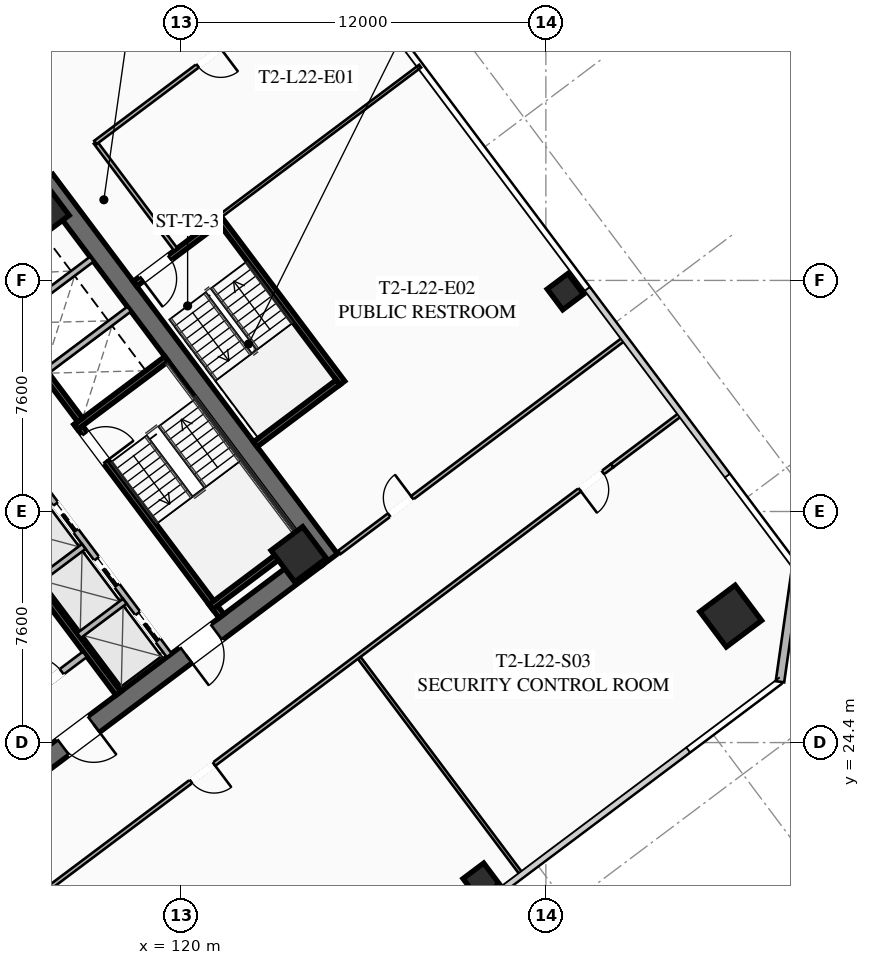
"""IFC4 building model, lengths in metres.
Left out: names, types, materials, properties, quantities, classifications, styles, units other than length and angle.
Written with IfcOpenShell. Run it as: python <this file> out.ifc"""

import sys

from ifc_helpers import new_model, si_unit, direction, frame, frame_2d, origin, origin_2d, place, context, subcontext, project, spatial, rectangle, hollow_rectangle, extrude, element, fill, save


model = new_model("IFC4")
c1 = context("Model", 3, precision=1e-05, world=origin(), true_north=direction((0.0, 1.0)))
c2 = subcontext(c1, "Body", "Model", "MODEL_VIEW")
j1 = project(units=[si_unit("LENGTHUNIT", "METRE"), si_unit("PLANEANGLEUNIT", "RADIAN")], contexts=[c1])
p1 = place(None, origin())
s1 = spatial("IfcSite", under=j1, at=p1, CompositionType="ELEMENT")
p2 = place(p1, origin())
s2 = spatial("IfcBuilding", under=s1, at=p2, CompositionType="ELEMENT")
p3 = place(p2, frame((0.0, 0.0, 84.95)))
s3 = spatial("IfcBuildingStorey", under=s2, at=p3, CompositionType="ELEMENT", Elevation=84.95)
p4 = place(p3, frame((115.524, 42.893, 0.0), z_axis=(0.0, 0.0, 1.0), x_axis=(0.600005007985, -0.799996243986, 0.0)))
e1 = element("IfcWall", 1, at=p4, inside=s3, PredefinedType="SHEAR", context=c2, shape_type="SweptSolid", body=[
    extrude(rectangle(XDim=15.6, YDim=0.65, at=frame_2d((7.8, 0.0))), origin(), (0.0, 0.0, 1.0), 3.55),
])
p5 = place(p3, frame((124.429, 30.478, 0.0), z_axis=(0.0, 0.0, 1.0), x_axis=(-0.799998028465, -0.600002628705, 0.0)))
e2 = element("IfcWall", 2, at=p5, inside=s3, PredefinedType="SHEAR", context=c2, shape_type="SweptSolid", body=[
    extrude(rectangle(XDim=14.86, YDim=0.65, at=frame_2d((7.43, 0.0))), origin(), (0.0, 0.0, 1.0), 3.55),
])
p6 = place(p5, frame((9.13, 0.0, 0.0)))
e3 = element("IfcOpeningElement", 3, at=p6, cuts=e2, PredefinedType="OPENING", context=c2, shape_type="SweptSolid", body=[
    extrude(rectangle(XDim=1.25, YDim=2.25, at=frame_2d((0.625, 1.125))), frame((0.0, 0.335, 0.0), z_axis=(0.0, -1.0, 0.0), x_axis=(1.0, 0.0, 0.0)), (0.0, 0.0, 1.0), 0.67),
])
p7 = place(p5, frame((4.08, 0.0, 0.0)))
e4 = element("IfcOpeningElement", 4, at=p7, cuts=e2, PredefinedType="OPENING", context=c2, shape_type="SweptSolid", body=[
    extrude(rectangle(XDim=1.25, YDim=2.25, at=frame_2d((0.625, 1.125))), frame((0.0, 0.335, 0.0), z_axis=(0.0, -1.0, 0.0), x_axis=(1.0, 0.0, 0.0)), (0.0, 0.0, 1.0), 0.67),
])
for number, where, z_axis, x_axis in (
    (5, (123.87, 30.59, 0.0), (0.0, 0.0, 1.0), (0.8, 0.6, 0.0)),
    (6, (115.41, 41.87, 0.0), (0.0, 0.0, 1.0), (0.8, 0.6, 0.0)),
):
    element("IfcColumn", number, at=place(p3, frame(where, z_axis=z_axis, x_axis=x_axis)), inside=s3, PredefinedType="COLUMN", context=c2, shape_type="SweptSolid", body=[
        extrude(hollow_rectangle(XDim=1.3, YDim=1.3, WallThickness=0.05, at=origin_2d()), origin(), (0.0, 0.0, 1.0), 3.35),
    ])
p8 = place(p3, frame((138.08, 28.56, 0.0), z_axis=(0.0, 0.0, 1.0), x_axis=(0.799999996291, 0.600000004945, 0.0)))
e7 = element("IfcColumn", 7, at=p8, inside=s3, PredefinedType="COLUMN", context=c2, shape_type="SweptSolid", body=[
    extrude(hollow_rectangle(XDim=1.45, YDim=1.45, WallThickness=0.055, at=origin_2d()), origin(), (0.0, 0.0, 1.0), 3.35),
])
for number, where, z_axis, x_axis in (
    (8, (129.87, 19.84, 0.0), (0.0, 0.0, 1.0), (0.8, 0.6, 0.0)),
    (9, (132.64, 39.23, 0.0), (0.0, 0.0, 1.0), (0.8, 0.6, 0.0)),
):
    element("IfcColumn", number, at=place(p3, frame(where, z_axis=z_axis, x_axis=x_axis)), inside=s3, PredefinedType="COLUMN", context=c2, shape_type="SweptSolid", body=[
        extrude(hollow_rectangle(XDim=0.85, YDim=0.85, WallThickness=0.035, at=origin_2d()), origin(), (0.0, 0.0, 1.0), 3.35),
    ])
p9 = place(p3, frame((140.24, 30.18, 0.0), z_axis=(0.0, 0.0, 1.0), x_axis=(-0.141430307517, -0.989948214866, 0.0)))
e10 = element("IfcWall", 10, at=p9, inside=s3, PredefinedType="SOLIDWALL", context=c2, shape_type="SweptSolid", body=[
    extrude(rectangle(XDim=3.818, YDim=0.28, at=frame_2d((1.909, 0.0))), origin(), (0.0, 0.0, 1.0), 3.35),
])
p10 = place(p3, frame((116.56, 34.92, 0.0), z_axis=(0.0, 0.0, 1.0), x_axis=(0.600009827119, -0.799992629566, 0.0)))
e11 = element("IfcWall", 11, at=p10, inside=s3, PredefinedType="SHEAR", context=c2, shape_type="SweptSolid", body=[
    extrude(rectangle(XDim=7.95, YDim=0.2, at=frame_2d((3.975, 0.0))), origin(), (0.0, 0.0, 1.0), 3.35),
])
p11 = place(p10, frame((0.45, 0.0, 0.0)))
e12 = element("IfcOpeningElement", 12, at=p11, cuts=e11, PredefinedType="OPENING", context=c2, shape_type="SweptSolid", body=[
    extrude(rectangle(XDim=1.15, YDim=2.2, at=frame_2d((0.575, 1.1))), frame((0.0, 0.11, 0.0), z_axis=(0.0, -1.0, 0.0), x_axis=(1.0, 0.0, 0.0)), (0.0, 0.0, 1.0), 0.22),
])
for number, where, z_axis, x_axis in (
    (13, (116.54, 34.78, 0.0), (0.0, 0.0, 1.0), (0.8, 0.6, 0.0)),
    (14, (120.98, 28.86, 0.0), (0.0, 0.0, 1.0), (0.8, 0.6, 0.0)),
):
    element("IfcWall", number, at=place(p3, frame(where, z_axis=z_axis, x_axis=x_axis)), inside=s3, PredefinedType="SHEAR", context=c2, shape_type="SweptSolid", body=[
        extrude(rectangle(XDim=3.73, YDim=0.2, at=frame_2d((1.865, 0.0))), origin(), (0.0, 0.0, 1.0), 3.35),
    ])
p12 = place(p3, frame((117.938, 26.016, 0.0), z_axis=(0.0, 0.0, 1.0), x_axis=(-0.600005463273, 0.799995902516, 0.0)))
e15 = element("IfcWall", 15, at=p12, inside=s3, PredefinedType="SHEAR", context=c2, shape_type="SweptSolid", body=[
    extrude(rectangle(XDim=14.3, YDim=0.2, at=frame_2d((7.15, 0.0))), origin(), (0.0, 0.0, 1.0), 3.35),
])
p13 = place(p3, frame((114.316, 25.412, 0.0), z_axis=(0.0, 0.0, 1.0), x_axis=(0.800018601094, 0.59997519774, 0.0)))
e16 = element("IfcWall", 16, at=p13, inside=s3, PredefinedType="SOLIDWALL", context=c2, shape_type="SweptSolid", body=[
    extrude(rectangle(XDim=3.15, YDim=0.22, at=frame_2d((1.575, 0.0))), origin(), (0.0, 0.0, 1.0), 2.703),
])
p14 = place(p13, frame((0.95, 0.0, 0.0)))
e17 = element("IfcOpeningElement", 17, at=p14, cuts=e16, PredefinedType="OPENING", context=c2, shape_type="SweptSolid", body=[
    extrude(rectangle(XDim=1.25, YDim=2.25, at=frame_2d((0.625, 1.125))), frame((0.0, 0.12, 0.0), z_axis=(0.0, -1.0, 0.0), x_axis=(1.0, 0.0, 0.0)), (0.0, 0.0, 1.0), 0.24),
])
p15 = place(p3, frame((112.87, 40.09, 0.0), z_axis=(0.0, 0.0, 1.0), x_axis=(0.599975393228, -0.800018454488, 0.0)))
e18 = element("IfcWall", 18, at=p15, inside=s3, PredefinedType="SHEAR", context=c2, shape_type="SweptSolid", body=[
    extrude(rectangle(XDim=6.35, YDim=0.2, at=frame_2d((3.175, 0.0))), origin(), (0.0, 0.0, 1.0), 3.35),
])
for number, where, z_axis, x_axis in (
    (19, (115.59, 36.63, 0.0), (0.0, 0.0, 1.0), (0.8, 0.6, 0.0)),
    (20, (114.36, 38.27, 0.0), (0.0, 0.0, 1.0), (0.8, 0.6, 0.0)),
):
    element("IfcWall", number, at=place(p3, frame(where, z_axis=z_axis, x_axis=x_axis)), inside=s3, PredefinedType="SOLIDWALL", context=c2, shape_type="SweptSolid", body=[
        extrude(rectangle(XDim=3.38, YDim=0.2, at=frame_2d((1.69, 0.0))), origin(), (0.0, 0.0, 1.0), 3.35),
    ])
p16 = place(p3, frame((119.61, 27.27, 0.0), z_axis=(0.0, 0.0, 1.0), x_axis=(-0.600011488909, 0.79999138319, 0.0)))
e21 = element("IfcWall", 21, at=p16, inside=s3, PredefinedType="SOLIDWALL", context=c2, shape_type="SweptSolid", body=[
    extrude(rectangle(XDim=6.8, YDim=0.2, at=frame_2d((3.4, 0.0))), origin(), (0.0, 0.0, 1.0), 3.35),
])
p17 = place(p16, frame((0.625, 0.0, 0.0)))
e22 = element("IfcOpeningElement", 22, at=p17, cuts=e21, PredefinedType="OPENING", context=c2, shape_type="SweptSolid", body=[
    extrude(rectangle(XDim=1.1, YDim=2.2, at=frame_2d((0.55, 1.1))), frame((0.0, 0.11, 0.0), z_axis=(0.0, -1.0, 0.0), x_axis=(1.0, 0.0, 0.0)), (0.0, 0.0, 1.0), 0.22),
])
p18 = place(p16, frame((2.875, 0.0, 0.0)))
e23 = element("IfcOpeningElement", 23, at=p18, cuts=e21, PredefinedType="OPENING", context=c2, shape_type="SweptSolid", body=[
    extrude(rectangle(XDim=1.1, YDim=2.2, at=frame_2d((0.55, 1.1))), frame((0.0, 0.11, 0.0), z_axis=(0.0, -1.0, 0.0), x_axis=(1.0, 0.0, 0.0)), (0.0, 0.0, 1.0), 0.22),
])
p19 = place(p16, frame((5.125, 0.0, 0.0)))
e24 = element("IfcOpeningElement", 24, at=p19, cuts=e21, PredefinedType="OPENING", context=c2, shape_type="SweptSolid", body=[
    extrude(rectangle(XDim=1.1, YDim=2.2, at=frame_2d((0.55, 1.1))), frame((0.0, 0.11, 0.0), z_axis=(0.0, -1.0, 0.0), x_axis=(1.0, 0.0, 0.0)), (0.0, 0.0, 1.0), 0.22),
])
p20 = place(p3, frame((116.646, 27.922, 0.0), z_axis=(0.0, 0.0, 1.0), x_axis=(0.8, 0.6, 0.0)))
e25 = element("IfcWall", 25, at=p20, inside=s3, PredefinedType="SOLIDWALL", context=c2, shape_type="SweptSolid", body=[
    extrude(rectangle(XDim=1.88, YDim=0.2, at=frame_2d((0.94, 0.0))), origin(), (0.0, 0.0, 1.0), 3.35),
])
p21 = place(p3, frame((115.296, 29.722, 0.0), z_axis=(0.0, 0.0, 1.0), x_axis=(0.799984418148, 0.600020775241, 0.0)))
e26 = element("IfcWall", 26, at=p21, inside=s3, PredefinedType="SOLIDWALL", context=c2, shape_type="SweptSolid", body=[
    extrude(rectangle(XDim=1.88, YDim=0.2, at=frame_2d((0.94, 0.0))), origin(), (0.0, 0.0, 1.0), 3.35),
])
p22 = place(p3, frame((125.304, 36.228, 0.0), z_axis=(0.0, 0.0, 1.0), x_axis=(-0.59998851072, 0.800008616831, 0.0)))
e27 = element("IfcWall", 27, at=p22, inside=s3, PredefinedType="SHEAR", context=c2, shape_type="SweptSolid", body=[
    extrude(rectangle(XDim=6.8, YDim=0.2, at=frame_2d((3.4, 0.0))), origin(), (0.0, 0.0, 1.0), 3.35),
])
p23 = place(p3, frame((121.204, 41.528, 0.0), z_axis=(0.0, 0.0, 1.0), x_axis=(-0.800017232136, -0.599977023131, 0.0)))
e28 = element("IfcWall", 28, at=p23, inside=s3, PredefinedType="SHEAR", context=c2, shape_type="SweptSolid", body=[
    extrude(rectangle(XDim=3.4, YDim=0.2, at=frame_2d((1.7, 0.0))), origin(), (0.0, 0.0, 1.0), 3.35),
])
p24 = place(p23, frame((1.975, 0.0, 0.0)))
e29 = element("IfcOpeningElement", 29, at=p24, cuts=e28, PredefinedType="OPENING", context=c2, shape_type="SweptSolid", body=[
    extrude(rectangle(XDim=1.15, YDim=2.2, at=frame_2d((0.575, 1.1))), frame((0.0, 0.11, 0.0), z_axis=(0.0, -1.0, 0.0), x_axis=(1.0, 0.0, 0.0)), (0.0, 0.0, 1.0), 0.22),
])
p25 = place(p3, frame((122.444, 34.208, 0.0), z_axis=(0.0, 0.0, 1.0), x_axis=(0.79999138319, 0.600011488909, 0.0)))
e30 = element("IfcWall", 30, at=p25, inside=s3, PredefinedType="SHEAR", context=c2, shape_type="SweptSolid", body=[
    extrude(rectangle(XDim=3.4, YDim=0.2, at=frame_2d((1.7, 0.0))), origin(), (0.0, 0.0, 1.0), 3.35),
])
p26 = place(p3, frame((119.824, 40.618, 0.0), z_axis=(0.0, 0.0, 1.0), x_axis=(-0.599982243973, 0.800013316712, 0.0)))
e31 = element("IfcWall", 31, at=p26, inside=s3, PredefinedType="PARTITIONING", context=c2, shape_type="SweptSolid", body=[
    extrude(rectangle(XDim=4.4, YDim=0.135, at=frame_2d((2.2, 0.0))), origin(), (0.0, 0.0, 1.0), 2.703),
])
p27 = place(p3, frame((98.336, 34.252, 0.0), z_axis=(0.0, 0.0, 1.0), x_axis=(0.8, 0.6, 0.0)))
e32 = element("IfcWall", 32, at=p27, inside=s3, PredefinedType="PARTITIONING", context=c2, shape_type="SweptSolid", body=[
    extrude(rectangle(XDim=28.23, YDim=0.135, at=frame_2d((14.115, 0.0))), origin(), (0.0, 0.0, 1.0), 2.703),
])
p28 = place(p27, frame((0.3, 0.0, 0.0)))
e33 = element("IfcOpeningElement", 33, at=p28, cuts=e32, PredefinedType="OPENING", context=c2, shape_type="SweptSolid", body=[
    extrude(rectangle(XDim=0.95, YDim=2.05, at=frame_2d((0.475, 1.025))), frame((0.0, 0.077, 0.0), z_axis=(0.0, -1.0, 0.0), x_axis=(1.0, 0.0, 0.0)), (0.0, 0.0, 1.0), 0.155),
])
p29 = place(p27, frame((10.953, 0.0, 0.0)))
e34 = element("IfcOpeningElement", 34, at=p29, cuts=e32, PredefinedType="OPENING", context=c2, shape_type="SweptSolid", body=[
    extrude(rectangle(XDim=0.95, YDim=2.05, at=frame_2d((0.475, 1.025))), frame((0.0, 0.077, 0.0), z_axis=(0.0, -1.0, 0.0), x_axis=(1.0, 0.0, 0.0)), (0.0, 0.0, 1.0), 0.155),
])
p30 = place(p27, frame((14.758, 0.0, 0.0)))
e35 = element("IfcOpeningElement", 35, at=p30, cuts=e32, PredefinedType="OPENING", context=c2, shape_type="SweptSolid", body=[
    extrude(rectangle(XDim=0.95, YDim=2.05, at=frame_2d((0.475, 1.025))), frame((0.0, 0.077, 0.0), z_axis=(0.0, -1.0, 0.0), x_axis=(1.0, 0.0, 0.0)), (0.0, 0.0, 1.0), 0.155),
])
p31 = place(p27, frame((26.98, 0.0, 0.0)))
e36 = element("IfcOpeningElement", 36, at=p31, cuts=e32, PredefinedType="OPENING", context=c2, shape_type="SweptSolid", body=[
    extrude(rectangle(XDim=0.95, YDim=2.05, at=frame_2d((0.475, 1.025))), frame((0.0, 0.077, 0.0), z_axis=(0.0, -1.0, 0.0), x_axis=(1.0, 0.0, 0.0)), (0.0, 0.0, 1.0), 0.155),
])
p32 = place(p3, frame((134.18, 33.51, 0.0), z_axis=(0.0, 0.0, 1.0), x_axis=(-0.8, -0.6, 0.0)))
e37 = element("IfcWall", 37, at=p32, inside=s3, PredefinedType="PARTITIONING", context=c2, shape_type="SweptSolid", body=[
    extrude(rectangle(XDim=28.23, YDim=0.135, at=frame_2d((14.115, 0.0))), origin(), (0.0, 0.0, 1.0), 2.703),
])
p33 = place(p32, frame((26.9, 0.0, 0.0)))
e38 = element("IfcOpeningElement", 38, at=p33, cuts=e37, PredefinedType="OPENING", context=c2, shape_type="SweptSolid", body=[
    extrude(rectangle(XDim=0.95, YDim=2.05, at=frame_2d((0.475, 1.025))), frame((0.0, 0.077, 0.0), z_axis=(0.0, -1.0, 0.0), x_axis=(1.0, 0.0, 0.0)), (0.0, 0.0, 1.0), 0.155),
])
p34 = place(p32, frame((16.368, 0.0, 0.0)))
e39 = element("IfcOpeningElement", 39, at=p34, cuts=e37, PredefinedType="OPENING", context=c2, shape_type="SweptSolid", body=[
    extrude(rectangle(XDim=0.95, YDim=2.05, at=frame_2d((0.475, 1.025))), frame((0.0, 0.077, 0.0), z_axis=(0.0, -1.0, 0.0), x_axis=(1.0, 0.0, 0.0)), (0.0, 0.0, 1.0), 0.155),
])
p35 = place(p32, frame((0.38, 0.0, 0.0)))
e40 = element("IfcOpeningElement", 40, at=p35, cuts=e37, PredefinedType="OPENING", context=c2, shape_type="SweptSolid", body=[
    extrude(rectangle(XDim=0.95, YDim=2.05, at=frame_2d((0.475, 1.025))), frame((0.0, 0.077, 0.0), z_axis=(0.0, -1.0, 0.0), x_axis=(1.0, 0.0, 0.0)), (0.0, 0.0, 1.0), 0.155),
])
p36 = place(p3, frame((134.18, 33.51, 0.0), z_axis=(0.0, 0.0, 1.0), x_axis=(0.8000207031, 0.599972394874, 0.0)))
e41 = element("IfcWall", 41, at=p36, inside=s3, PredefinedType="PARTITIONING", context=c2, shape_type="SweptSolid", body=[
    extrude(rectangle(XDim=2.83, YDim=0.135, at=frame_2d((1.415, 0.0))), origin(), (0.0, 0.0, 1.0), 2.703),
])
p37 = place(p3, frame((131.208, 20.056, 0.0), z_axis=(0.0, 0.0, 1.0), x_axis=(-0.6, 0.8, 0.0)))
e42 = element("IfcWall", 42, at=p37, inside=s3, PredefinedType="PARTITIONING", context=c2, shape_type="SweptSolid", body=[
    extrude(rectangle(XDim=8.9, YDim=0.11, at=frame_2d((4.45, 0.0))), origin(), (0.0, 0.0, 1.0), 2.703),
])
p38 = place(p3, frame((125.224, 50.168, 0.0), z_axis=(0.0, 0.0, 1.0), x_axis=(-0.8, -0.6, 0.0)))
e43 = element("IfcWall", 43, at=p38, inside=s3, PredefinedType="PARTITIONING", context=c2, shape_type="SweptSolid", body=[
    extrude(rectangle(XDim=10.05, YDim=0.135, at=frame_2d((5.025, 0.0))), origin(), (0.0, 0.0, 1.0), 2.703),
])
p39 = place(p38, frame((4.9, 0.0, 0.0)))
e44 = element("IfcOpeningElement", 44, at=p39, cuts=e43, PredefinedType="OPENING", context=c2, shape_type="SweptSolid", body=[
    extrude(rectangle(XDim=0.95, YDim=2.05, at=frame_2d((0.475, 1.025))), frame((0.0, 0.077, 0.0), z_axis=(0.0, -1.0, 0.0), x_axis=(1.0, 0.0, 0.0)), (0.0, 0.0, 1.0), 0.155),
])
p40 = place(p3, frame((125.208, 30.656, 0.0), z_axis=(0.0, 0.0, 1.0), x_axis=(0.8, 0.6, 0.0)))
e45 = element("IfcWall", 45, at=p40, inside=s3, PredefinedType="PARTITIONING", context=c2, shape_type="SweptSolid", body=[
    extrude(rectangle(XDim=11.72, YDim=0.135, at=frame_2d((5.86, 0.0))), origin(), (0.0, 0.0, 1.0), 2.703),
])
p41 = place(p40, frame((2.045, 0.0, 0.0)))
e46 = element("IfcOpeningElement", 46, at=p41, cuts=e45, PredefinedType="OPENING", context=c2, shape_type="SweptSolid", body=[
    extrude(rectangle(XDim=0.95, YDim=2.05, at=frame_2d((0.475, 1.025))), frame((0.0, 0.077, 0.0), z_axis=(0.0, -1.0, 0.0), x_axis=(1.0, 0.0, 0.0)), (0.0, 0.0, 1.0), 0.155),
])
p42 = place(p3, frame((127.864, 46.648, 0.0), z_axis=(0.0, 0.0, 1.0), x_axis=(-0.800007145523, -0.599990472518, 0.0)))
e47 = element("IfcWall", 47, at=p42, inside=s3, PredefinedType="PARTITIONING", context=c2, shape_type="SweptSolid", body=[
    extrude(rectangle(XDim=8.2, YDim=0.11, at=frame_2d((4.1, 0.0))), origin(), (0.0, 0.0, 1.0), 2.703),
])
p43 = place(p6, origin())
e48 = element("IfcDoor", 48, at=p43, inside=s3, OperationType="SINGLE_SWING_LEFT", PredefinedType="DOOR", context=c2, shape_type="SweptSolid", body=[
    extrude(rectangle(XDim=1.25, YDim=2.25, at=frame_2d((0.625, 1.125))), frame((0.0, 0.025, 0.0), z_axis=(0.0, -1.0, 0.0), x_axis=(1.0, 0.0, 0.0)), (0.0, 0.0, 1.0), 0.05),
])
fill(e3, e48)
p44 = place(p7, origin())
e49 = element("IfcDoor", 49, at=p44, inside=s3, OperationType="SINGLE_SWING_RIGHT", PredefinedType="DOOR", context=c2, shape_type="SweptSolid", body=[
    extrude(rectangle(XDim=1.25, YDim=2.25, at=frame_2d((0.625, 1.125))), frame((0.0, 0.025, 0.0), z_axis=(0.0, -1.0, 0.0), x_axis=(1.0, 0.0, 0.0)), (0.0, 0.0, 1.0), 0.05),
])
fill(e4, e49)
p45 = place(p11, origin())
e50 = element("IfcDoor", 50, at=p45, inside=s3, OperationType="SINGLE_SWING_RIGHT", PredefinedType="DOOR", context=c2, shape_type="SweptSolid", body=[
    extrude(rectangle(XDim=1.15, YDim=2.2, at=frame_2d((0.575, 1.1))), frame((0.0, 0.025, 0.0), z_axis=(0.0, -1.0, 0.0), x_axis=(1.0, 0.0, 0.0)), (0.0, 0.0, 1.0), 0.05),
])
fill(e12, e50)
p46 = place(p14, origin())
e51 = element("IfcDoor", 51, at=p46, inside=s3, OperationType="SINGLE_SWING_LEFT", PredefinedType="DOOR", context=c2, shape_type="SweptSolid", body=[
    extrude(rectangle(XDim=1.25, YDim=2.25, at=frame_2d((0.625, 1.125))), frame((0.0, 0.025, 0.0), z_axis=(0.0, -1.0, 0.0), x_axis=(1.0, 0.0, 0.0)), (0.0, 0.0, 1.0), 0.05),
])
fill(e17, e51)
p47 = place(p24, origin())
e52 = element("IfcDoor", 52, at=p47, inside=s3, OperationType="SINGLE_SWING_RIGHT", PredefinedType="DOOR", context=c2, shape_type="SweptSolid", body=[
    extrude(rectangle(XDim=1.15, YDim=2.2, at=frame_2d((0.575, 1.1))), frame((0.0, 0.025, 0.0), z_axis=(0.0, -1.0, 0.0), x_axis=(1.0, 0.0, 0.0)), (0.0, 0.0, 1.0), 0.05),
])
fill(e29, e52)
p48 = place(p34, origin())
e53 = element("IfcDoor", 53, at=p48, inside=s3, OperationType="SINGLE_SWING_LEFT", PredefinedType="DOOR", context=c2, shape_type="SweptSolid", body=[
    extrude(rectangle(XDim=0.95, YDim=2.05, at=frame_2d((0.475, 1.025))), frame((0.0, 0.025, 0.0), z_axis=(0.0, -1.0, 0.0), x_axis=(1.0, 0.0, 0.0)), (0.0, 0.0, 1.0), 0.05),
])
fill(e39, e53)
p49 = place(p35, origin())
e54 = element("IfcDoor", 54, at=p49, inside=s3, OperationType="SINGLE_SWING_RIGHT", PredefinedType="DOOR", context=c2, shape_type="SweptSolid", body=[
    extrude(rectangle(XDim=0.95, YDim=2.05, at=frame_2d((0.475, 1.025))), frame((0.0, 0.025, 0.0), z_axis=(0.0, -1.0, 0.0), x_axis=(1.0, 0.0, 0.0)), (0.0, 0.0, 1.0), 0.05),
])
fill(e40, e54)
p50 = place(p39, origin())
e55 = element("IfcDoor", 55, at=p50, inside=s3, OperationType="SINGLE_SWING_LEFT", PredefinedType="DOOR", context=c2, shape_type="SweptSolid", body=[
    extrude(rectangle(XDim=0.95, YDim=2.05, at=frame_2d((0.475, 1.025))), frame((0.0, 0.025, 0.0), z_axis=(0.0, -1.0, 0.0), x_axis=(1.0, 0.0, 0.0)), (0.0, 0.0, 1.0), 0.05),
])
fill(e44, e55)
p51 = place(p41, origin())
e56 = element("IfcDoor", 56, at=p51, inside=s3, OperationType="SINGLE_SWING_RIGHT", PredefinedType="DOOR", context=c2, shape_type="SweptSolid", body=[
    extrude(rectangle(XDim=0.95, YDim=2.05, at=frame_2d((0.475, 1.025))), frame((0.0, 0.025, 0.0), z_axis=(0.0, -1.0, 0.0), x_axis=(1.0, 0.0, 0.0)), (0.0, 0.0, 1.0), 0.05),
])
fill(e46, e56)
p52 = place(p17, origin())
e57 = element("IfcDoor", 57, at=p52, inside=s3, OperationType="SLIDING_TO_LEFT", PredefinedType="DOOR", context=c2, shape_type="SweptSolid", body=[
    extrude(rectangle(XDim=1.1, YDim=2.2, at=frame_2d((0.55, 1.1))), frame((0.0, 0.025, 0.0), z_axis=(0.0, -1.0, 0.0), x_axis=(1.0, 0.0, 0.0)), (0.0, 0.0, 1.0), 0.05),
])
fill(e22, e57)
p53 = place(p18, origin())
e58 = element("IfcDoor", 58, at=p53, inside=s3, OperationType="SLIDING_TO_LEFT", PredefinedType="DOOR", context=c2, shape_type="SweptSolid", body=[
    extrude(rectangle(XDim=1.1, YDim=2.2, at=frame_2d((0.55, 1.1))), frame((0.0, 0.025, 0.0), z_axis=(0.0, -1.0, 0.0), x_axis=(1.0, 0.0, 0.0)), (0.0, 0.0, 1.0), 0.05),
])
fill(e23, e58)
p54 = place(p19, origin())
e59 = element("IfcDoor", 59, at=p54, inside=s3, OperationType="SLIDING_TO_LEFT", PredefinedType="DOOR", context=c2, shape_type="SweptSolid", body=[
    extrude(rectangle(XDim=1.1, YDim=2.2, at=frame_2d((0.55, 1.1))), frame((0.0, 0.025, 0.0), z_axis=(0.0, -1.0, 0.0), x_axis=(1.0, 0.0, 0.0)), (0.0, 0.0, 1.0), 0.05),
])
fill(e24, e59)
save(model, sys.argv[1])
